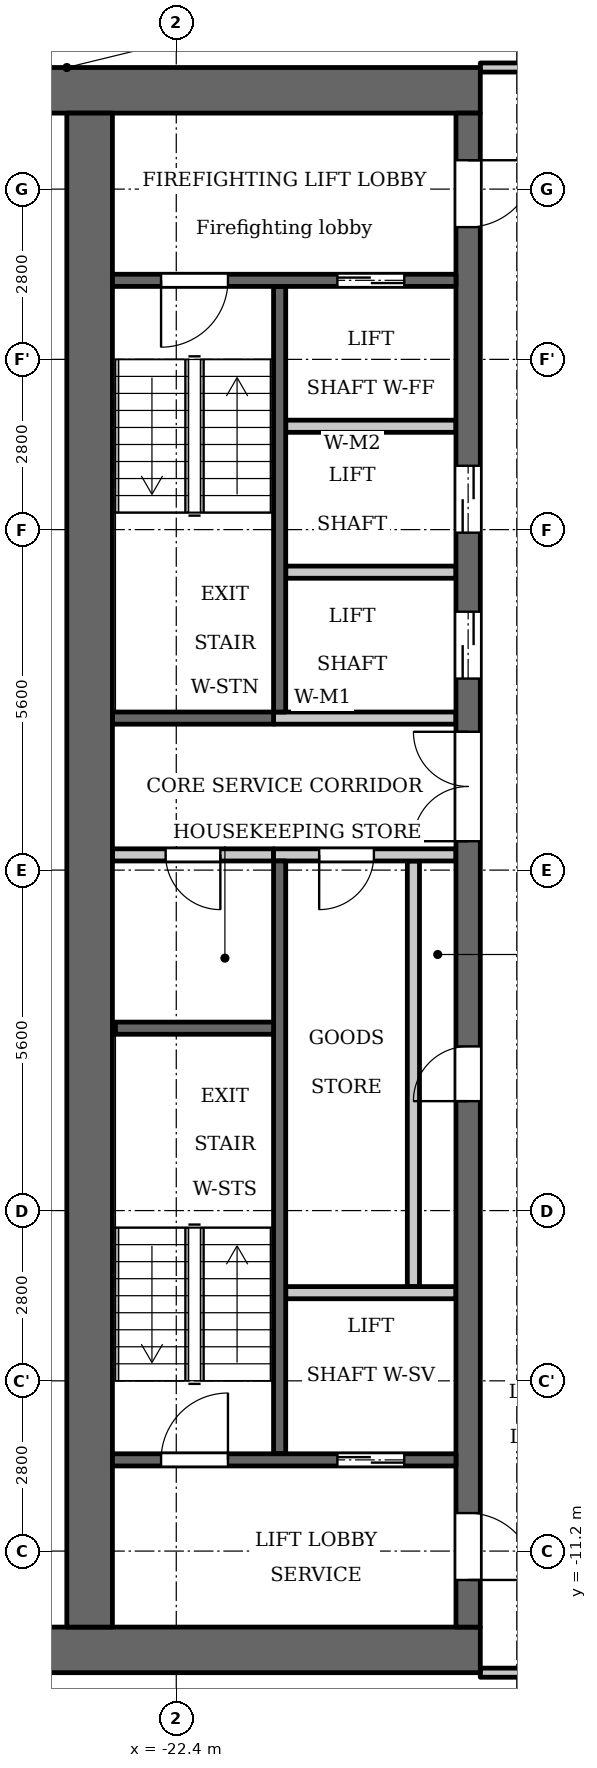
"""IFC4 building model, lengths in metres.
Left out: names, types, materials, properties, quantities, classifications, styles, units other than length and angle.
Written with IfcOpenShell. Run it as: python <this file> out.ifc"""

import sys

from ifc_helpers import new_model, si_unit, direction, frame, frame_2d, origin, place, context, subcontext, project, spatial, rectangle, extrude, element, fill, save


model = new_model("IFC4")
c1 = context("Model", 3, precision=1e-05, world=origin(), true_north=direction((0.0, 1.0)))
c2 = subcontext(c1, "Body", "Model", "MODEL_VIEW")
j1 = project(units=[si_unit("LENGTHUNIT", "METRE"), si_unit("PLANEANGLEUNIT", "RADIAN")], contexts=[c1])
p1 = place(None, origin())
s1 = spatial("IfcSite", under=j1, at=p1, CompositionType="ELEMENT")
p2 = place(p1, origin())
s2 = spatial("IfcBuilding", under=s1, at=p2, CompositionType="ELEMENT")
p3 = place(p2, frame((0.0, 0.0, 223.9)))
s3 = spatial("IfcBuildingStorey", under=s2, at=p3, CompositionType="ELEMENT", Elevation=223.9)
p4 = place(p3, frame((-20.7, 2.6, 0.0), z_axis=(0.0, 0.0, 1.0), x_axis=(0.0, 1.0, 0.0)))
e1 = element("IfcWall", 1, at=p4, inside=s3, PredefinedType="SHEAR", context=c2, shape_type="SweptSolid", body=[
    extrude(rectangle(XDim=7.0, YDim=0.2, at=frame_2d((3.5, 0.0))), origin(), (0.0, 0.0, 1.0), 3.2),
])
p5 = place(p3, frame((-20.7, -9.6, 0.0), z_axis=(0.0, 0.0, 1.0), x_axis=(0.0, 1.0, 0.0)))
e2 = element("IfcWall", 2, at=p5, inside=s3, PredefinedType="SHEAR", context=c2, shape_type="SweptSolid", body=[
    extrude(rectangle(XDim=9.75, YDim=0.2, at=frame_2d((4.875, 0.0))), origin(), (0.0, 0.0, 1.0), 3.2),
])
p6 = place(p3, frame((-20.8, 2.5, 0.0), z_axis=(0.0, 0.0, 1.0), x_axis=(-1.0, 0.0, 0.0)))
e3 = element("IfcWall", 3, at=p6, inside=s3, PredefinedType="SHEAR", context=c2, shape_type="SweptSolid", body=[
    extrude(rectangle(XDim=2.65, YDim=0.2, at=frame_2d((1.325, 0.0))), origin(), (0.0, 0.0, 1.0), 3.2),
])
p7 = place(p3, frame((-20.8, 0.25, 0.0), z_axis=(0.0, 0.0, 1.0), x_axis=(-1.0, 0.0, 0.0)))
e4 = element("IfcWall", 4, at=p7, inside=s3, PredefinedType="PARTITIONING", context=c2, shape_type="SweptSolid", body=[
    extrude(rectangle(XDim=2.65, YDim=0.2, at=frame_2d((1.325, 0.0))), origin(), (0.0, 0.0, 1.0), 3.2),
])
p8 = place(p7, frame((0.875, 0.0, 0.0)))
e5 = element("IfcOpeningElement", 5, at=p8, cuts=e4, PredefinedType="OPENING", context=c2, shape_type="SweptSolid", body=[
    extrude(rectangle(XDim=0.9, YDim=2.1, at=frame_2d((0.45, 1.05))), frame((0.0, 0.11, 0.0), z_axis=(0.0, -1.0, 0.0), x_axis=(1.0, 0.0, 0.0)), (0.0, 0.0, 1.0), 0.22),
])
for number, where, z_axis, x_axis in (
    (6, (-17.4, 12.825, 0.0), (0.0, 0.0, 1.0), (-1.0, 0.0, 0.0)),
    (7, (-17.4, -12.825, 0.0), (0.0, 0.0, 1.0), (-1.0, 0.0, 0.0)),
):
    element("IfcWall", number, at=place(p3, frame(where, z_axis=z_axis, x_axis=x_axis)), inside=s3, PredefinedType="SHEAR", context=c2, shape_type="SweptSolid", body=[
        extrude(rectangle(XDim=7.6, YDim=0.75, at=frame_2d((3.8, 0.0))), origin(), (0.0, 0.0, 1.0), 3.2),
    ])
p9 = place(p3, frame((-18.5, -6.85, 0.0), z_axis=(0.0, 0.0, 1.0), x_axis=(0.0, 1.0, 0.0)))
e8 = element("IfcWall", 8, at=p9, inside=s3, PredefinedType="PARTITIONING", context=c2, shape_type="SweptSolid", body=[
    extrude(rectangle(XDim=7.0, YDim=0.2, at=frame_2d((3.5, 0.0))), origin(), (0.0, 0.0, 1.0), 3.2),
])
p10 = place(p3, frame((-17.6, -12.45, 0.0), z_axis=(0.0, 0.0, 1.0), x_axis=(0.0, 1.0, 0.0)))
e9 = element("IfcWall", 9, at=p10, inside=s3, PredefinedType="SHEAR", context=c2, shape_type="SweptSolid", body=[
    extrude(rectangle(XDim=24.9, YDim=0.4, at=frame_2d((12.45, 0.0))), origin(), (0.0, 0.0, 1.0), 3.2),
])
p11 = place(p10, frame((8.65, 0.0, 0.0)))
e10 = element("IfcOpeningElement", 10, at=p11, cuts=e9, PredefinedType="OPENING", context=c2, shape_type="SweptSolid", body=[
    extrude(rectangle(XDim=0.9, YDim=2.1, at=frame_2d((0.45, 1.05))), frame((0.0, 0.21, 0.0), z_axis=(0.0, -1.0, 0.0), x_axis=(1.0, 0.0, 0.0)), (0.0, 0.0, 1.0), 0.42),
])
p12 = place(p10, frame((15.6, 0.0, 0.0)))
e11 = element("IfcOpeningElement", 11, at=p12, cuts=e9, PredefinedType="OPENING", context=c2, shape_type="SweptSolid", body=[
    extrude(rectangle(XDim=1.1, YDim=2.1, at=frame_2d((0.55, 1.05))), frame((0.0, 0.21, 0.0), z_axis=(0.0, -1.0, 0.0), x_axis=(1.0, 0.0, 0.0)), (0.0, 0.0, 1.0), 0.42),
])
p13 = place(p10, frame((18.0, 0.0, 0.0)))
e12 = element("IfcOpeningElement", 12, at=p13, cuts=e9, PredefinedType="OPENING", context=c2, shape_type="SweptSolid", body=[
    extrude(rectangle(XDim=1.1, YDim=2.1, at=frame_2d((0.55, 1.05))), frame((0.0, 0.21, 0.0), z_axis=(0.0, -1.0, 0.0), x_axis=(1.0, 0.0, 0.0)), (0.0, 0.0, 1.0), 0.42),
])
p14 = place(p10, frame((23.025, 0.0, 0.0)))
e13 = element("IfcOpeningElement", 13, at=p14, cuts=e9, PredefinedType="OPENING", context=c2, shape_type="SweptSolid", body=[
    extrude(rectangle(XDim=1.1, YDim=2.1, at=frame_2d((0.55, 1.05))), frame((0.0, 0.21, 0.0), z_axis=(0.0, -1.0, 0.0), x_axis=(1.0, 0.0, 0.0)), (0.0, 0.0, 1.0), 0.42),
])
p15 = place(p10, frame((0.775, 0.0, 0.0)))
e14 = element("IfcOpeningElement", 14, at=p15, cuts=e9, PredefinedType="OPENING", context=c2, shape_type="SweptSolid", body=[
    extrude(rectangle(XDim=1.1, YDim=2.1, at=frame_2d((0.55, 1.05))), frame((0.0, 0.21, 0.0), z_axis=(0.0, -1.0, 0.0), x_axis=(1.0, 0.0, 0.0)), (0.0, 0.0, 1.0), 0.42),
])
p16 = place(p10, frame((12.925, 0.0, 0.0)))
e15 = element("IfcOpeningElement", 15, at=p16, cuts=e9, PredefinedType="OPENING", context=c2, shape_type="SweptSolid", body=[
    extrude(rectangle(XDim=1.8, YDim=2.1, at=frame_2d((0.9, 1.05))), frame((0.0, 0.21, 0.0), z_axis=(0.0, -1.0, 0.0), x_axis=(1.0, 0.0, 0.0)), (0.0, 0.0, 1.0), 0.42),
])
p17 = place(p3, frame((-23.825, -12.45, 0.0), z_axis=(0.0, 0.0, 1.0), x_axis=(0.0, 1.0, 0.0)))
e16 = element("IfcWall", 16, at=p17, inside=s3, PredefinedType="SHEAR", context=c2, shape_type="SweptSolid", body=[
    extrude(rectangle(XDim=24.9, YDim=0.75, at=frame_2d((12.45, 0.0))), origin(), (0.0, 0.0, 1.0), 3.2),
])
p18 = place(p3, frame((-17.8, -9.7, 0.0), z_axis=(0.0, 0.0, 1.0), x_axis=(-1.0, 0.0, 0.0)))
e17 = element("IfcWall", 17, at=p18, inside=s3, PredefinedType="SHEAR", context=c2, shape_type="SweptSolid", body=[
    extrude(rectangle(XDim=5.65, YDim=0.2, at=frame_2d((2.825, 0.0))), origin(), (0.0, 0.0, 1.0), 3.2),
])
p19 = place(p18, frame((0.85, 0.0, 0.0)))
e18 = element("IfcOpeningElement", 18, at=p19, cuts=e17, PredefinedType="OPENING", context=c2, shape_type="SweptSolid", body=[
    extrude(rectangle(XDim=1.1, YDim=2.1, at=frame_2d((0.55, 1.05))), frame((0.0, 0.11, 0.0), z_axis=(0.0, -1.0, 0.0), x_axis=(1.0, 0.0, 0.0)), (0.0, 0.0, 1.0), 0.22),
])
p20 = place(p18, frame((3.75, 0.0, 0.0)))
e19 = element("IfcOpeningElement", 19, at=p20, cuts=e17, PredefinedType="OPENING", context=c2, shape_type="SweptSolid", body=[
    extrude(rectangle(XDim=1.1, YDim=2.1, at=frame_2d((0.55, 1.05))), frame((0.0, 0.11, 0.0), z_axis=(0.0, -1.0, 0.0), x_axis=(1.0, 0.0, 0.0)), (0.0, 0.0, 1.0), 0.22),
])
p21 = place(p3, frame((-17.8, -6.95, 0.0), z_axis=(0.0, 0.0, 1.0), x_axis=(-1.0, 0.0, 0.0)))
e20 = element("IfcWall", 20, at=p21, inside=s3, PredefinedType="PARTITIONING", context=c2, shape_type="SweptSolid", body=[
    extrude(rectangle(XDim=2.8, YDim=0.2, at=frame_2d((1.4, 0.0))), origin(), (0.0, 0.0, 1.0), 3.2),
])
p22 = place(p3, frame((-17.8, 0.25, 0.0), z_axis=(0.0, 0.0, 1.0), x_axis=(-1.0, 0.0, 0.0)))
e21 = element("IfcWall", 21, at=p22, inside=s3, PredefinedType="PARTITIONING", context=c2, shape_type="SweptSolid", body=[
    extrude(rectangle(XDim=3.0, YDim=0.2, at=frame_2d((1.5, 0.0))), origin(), (0.0, 0.0, 1.0), 3.2),
])
p23 = place(p22, frame((1.35, 0.0, 0.0)))
e22 = element("IfcOpeningElement", 22, at=p23, cuts=e21, PredefinedType="OPENING", context=c2, shape_type="SweptSolid", body=[
    extrude(rectangle(XDim=0.9, YDim=2.1, at=frame_2d((0.45, 1.05))), frame((0.0, 0.11, 0.0), z_axis=(0.0, -1.0, 0.0), x_axis=(1.0, 0.0, 0.0)), (0.0, 0.0, 1.0), 0.22),
])
p24 = place(p3, frame((-17.8, 2.5, 0.0), z_axis=(0.0, 0.0, 1.0), x_axis=(-1.0, 0.0, 0.0)))
e23 = element("IfcWall", 23, at=p24, inside=s3, PredefinedType="PARTITIONING", context=c2, shape_type="SweptSolid", body=[
    extrude(rectangle(XDim=3.0, YDim=0.2, at=frame_2d((1.5, 0.0))), origin(), (0.0, 0.0, 1.0), 3.2),
])
for number, where, z_axis, x_axis in (
    (24, (-17.8, 4.9, 0.0), (0.0, 0.0, 1.0), (-1.0, 0.0, 0.0)),
    (25, (-17.8, 7.3, 0.0), (0.0, 0.0, 1.0), (-1.0, 0.0, 0.0)),
):
    element("IfcWall", number, at=place(p3, frame(where, z_axis=z_axis, x_axis=x_axis)), inside=s3, PredefinedType="PARTITIONING", context=c2, shape_type="SweptSolid", body=[
        extrude(rectangle(XDim=2.8, YDim=0.2, at=frame_2d((1.4, 0.0))), origin(), (0.0, 0.0, 1.0), 3.2),
    ])
p25 = place(p3, frame((-17.8, 9.7, 0.0), z_axis=(0.0, 0.0, 1.0), x_axis=(-1.0, 0.0, 0.0)))
e26 = element("IfcWall", 26, at=p25, inside=s3, PredefinedType="SHEAR", context=c2, shape_type="SweptSolid", body=[
    extrude(rectangle(XDim=5.65, YDim=0.2, at=frame_2d((2.825, 0.0))), origin(), (0.0, 0.0, 1.0), 3.2),
])
p26 = place(p25, frame((0.85, 0.0, 0.0)))
e27 = element("IfcOpeningElement", 27, at=p26, cuts=e26, PredefinedType="OPENING", context=c2, shape_type="SweptSolid", body=[
    extrude(rectangle(XDim=1.1, YDim=2.1, at=frame_2d((0.55, 1.05))), frame((0.0, 0.11, 0.0), z_axis=(0.0, -1.0, 0.0), x_axis=(1.0, 0.0, 0.0)), (0.0, 0.0, 1.0), 0.22),
])
p27 = place(p25, frame((3.75, 0.0, 0.0)))
e28 = element("IfcOpeningElement", 28, at=p27, cuts=e26, PredefinedType="OPENING", context=c2, shape_type="SweptSolid", body=[
    extrude(rectangle(XDim=1.1, YDim=2.1, at=frame_2d((0.55, 1.05))), frame((0.0, 0.11, 0.0), z_axis=(0.0, -1.0, 0.0), x_axis=(1.0, 0.0, 0.0)), (0.0, 0.0, 1.0), 0.22),
])
p28 = place(p3, frame((-20.8, -2.6, 0.0), z_axis=(0.0, 0.0, 1.0), x_axis=(-1.0, 0.0, 0.0)))
e29 = element("IfcWall", 29, at=p28, inside=s3, PredefinedType="SHEAR", context=c2, shape_type="SweptSolid", body=[
    extrude(rectangle(XDim=2.6, YDim=0.2, at=frame_2d((1.3, 0.0))), origin(), (0.0, 0.0, 1.0), 3.2),
])
p29 = place(p3, frame((-17.4, -13.2, 0.0), z_axis=(0.0, 0.0, 1.0), x_axis=(1.0, 0.0, 0.0)))
e30 = element("IfcWall", 30, at=p29, inside=s3, PredefinedType="PARTITIONING", context=c2, shape_type="SweptSolid", body=[
    extrude(rectangle(XDim=34.8, YDim=0.15, at=frame_2d((17.4, 0.0))), origin(), (0.0, 0.0, 1.0), 3.2),
])
p30 = place(p29, frame((0.65, 0.0, 0.0)))
e31 = element("IfcOpeningElement", 31, at=p30, cuts=e30, PredefinedType="OPENING", context=c2, shape_type="SweptSolid", body=[
    extrude(rectangle(XDim=1.0, YDim=2.1, at=frame_2d((0.5, 1.05))), frame((0.0, 0.085, 0.0), z_axis=(0.0, -1.0, 0.0), x_axis=(1.0, 0.0, 0.0)), (0.0, 0.0, 1.0), 0.17),
])
p31 = place(p29, frame((33.05, 0.0, 0.0)))
e32 = element("IfcOpeningElement", 32, at=p31, cuts=e30, PredefinedType="OPENING", context=c2, shape_type="SweptSolid", body=[
    extrude(rectangle(XDim=1.0, YDim=2.1, at=frame_2d((0.5, 1.05))), frame((0.0, 0.085, 0.0), z_axis=(0.0, -1.0, 0.0), x_axis=(1.0, 0.0, 0.0)), (0.0, 0.0, 1.0), 0.17),
])
p32 = place(p29, frame((10.15, 0.0, 0.0)))
e33 = element("IfcOpeningElement", 33, at=p32, cuts=e30, PredefinedType="OPENING", context=c2, shape_type="SweptSolid", body=[
    extrude(rectangle(XDim=1.0, YDim=2.1, at=frame_2d((0.5, 1.05))), frame((0.0, 0.085, 0.0), z_axis=(0.0, -1.0, 0.0), x_axis=(1.0, 0.0, 0.0)), (0.0, 0.0, 1.0), 0.17),
])
p33 = place(p29, frame((12.5, 0.0, 0.0)))
e34 = element("IfcOpeningElement", 34, at=p33, cuts=e30, PredefinedType="OPENING", context=c2, shape_type="SweptSolid", body=[
    extrude(rectangle(XDim=1.0, YDim=2.1, at=frame_2d((0.5, 1.05))), frame((0.0, 0.085, 0.0), z_axis=(0.0, -1.0, 0.0), x_axis=(1.0, 0.0, 0.0)), (0.0, 0.0, 1.0), 0.17),
])
p34 = place(p29, frame((18.0, 0.0, 0.0)))
e35 = element("IfcOpeningElement", 35, at=p34, cuts=e30, PredefinedType="OPENING", context=c2, shape_type="SweptSolid", body=[
    extrude(rectangle(XDim=1.0, YDim=2.1, at=frame_2d((0.5, 1.05))), frame((0.0, 0.085, 0.0), z_axis=(0.0, -1.0, 0.0), x_axis=(1.0, 0.0, 0.0)), (0.0, 0.0, 1.0), 0.17),
])
p35 = place(p29, frame((30.75, 0.0, 0.0)))
e36 = element("IfcOpeningElement", 36, at=p35, cuts=e30, PredefinedType="OPENING", context=c2, shape_type="SweptSolid", body=[
    extrude(rectangle(XDim=1.0, YDim=2.1, at=frame_2d((0.5, 1.05))), frame((0.0, 0.085, 0.0), z_axis=(0.0, -1.0, 0.0), x_axis=(1.0, 0.0, 0.0)), (0.0, 0.0, 1.0), 0.17),
])
p36 = place(p3, frame((-17.4, 13.2, 0.0), z_axis=(0.0, 0.0, 1.0), x_axis=(1.0, 0.0, 0.0)))
e37 = element("IfcWall", 37, at=p36, inside=s3, PredefinedType="PARTITIONING", context=c2, shape_type="SweptSolid", body=[
    extrude(rectangle(XDim=34.8, YDim=0.15, at=frame_2d((17.4, 0.0))), origin(), (0.0, 0.0, 1.0), 3.2),
])
p37 = place(p36, frame((0.75, 0.0, 0.0)))
e38 = element("IfcOpeningElement", 38, at=p37, cuts=e37, PredefinedType="OPENING", context=c2, shape_type="SweptSolid", body=[
    extrude(rectangle(XDim=1.0, YDim=2.1, at=frame_2d((0.5, 1.05))), frame((0.0, 0.085, 0.0), z_axis=(0.0, -1.0, 0.0), x_axis=(1.0, 0.0, 0.0)), (0.0, 0.0, 1.0), 0.17),
])
p38 = place(p36, frame((33.15, 0.0, 0.0)))
e39 = element("IfcOpeningElement", 39, at=p38, cuts=e37, PredefinedType="OPENING", context=c2, shape_type="SweptSolid", body=[
    extrude(rectangle(XDim=1.0, YDim=2.1, at=frame_2d((0.5, 1.05))), frame((0.0, 0.085, 0.0), z_axis=(0.0, -1.0, 0.0), x_axis=(1.0, 0.0, 0.0)), (0.0, 0.0, 1.0), 0.17),
])
p39 = place(p36, frame((3.05, 0.0, 0.0)))
e40 = element("IfcOpeningElement", 40, at=p39, cuts=e37, PredefinedType="OPENING", context=c2, shape_type="SweptSolid", body=[
    extrude(rectangle(XDim=1.0, YDim=2.1, at=frame_2d((0.5, 1.05))), frame((0.0, 0.085, 0.0), z_axis=(0.0, -1.0, 0.0), x_axis=(1.0, 0.0, 0.0)), (0.0, 0.0, 1.0), 0.17),
])
p40 = place(p36, frame((10.1, 0.0, 0.0)))
e41 = element("IfcOpeningElement", 41, at=p40, cuts=e37, PredefinedType="OPENING", context=c2, shape_type="SweptSolid", body=[
    extrude(rectangle(XDim=1.0, YDim=2.1, at=frame_2d((0.5, 1.05))), frame((0.0, 0.085, 0.0), z_axis=(0.0, -1.0, 0.0), x_axis=(1.0, 0.0, 0.0)), (0.0, 0.0, 1.0), 0.17),
])
p41 = place(p36, frame((12.45, 0.0, 0.0)))
e42 = element("IfcOpeningElement", 42, at=p41, cuts=e37, PredefinedType="OPENING", context=c2, shape_type="SweptSolid", body=[
    extrude(rectangle(XDim=1.0, YDim=2.1, at=frame_2d((0.5, 1.05))), frame((0.0, 0.085, 0.0), z_axis=(0.0, -1.0, 0.0), x_axis=(1.0, 0.0, 0.0)), (0.0, 0.0, 1.0), 0.17),
])
p42 = place(p36, frame((21.3, 0.0, 0.0)))
e43 = element("IfcOpeningElement", 43, at=p42, cuts=e37, PredefinedType="OPENING", context=c2, shape_type="SweptSolid", body=[
    extrude(rectangle(XDim=1.0, YDim=2.1, at=frame_2d((0.5, 1.05))), frame((0.0, 0.085, 0.0), z_axis=(0.0, -1.0, 0.0), x_axis=(1.0, 0.0, 0.0)), (0.0, 0.0, 1.0), 0.17),
])
p43 = place(p36, frame((23.65, 0.0, 0.0)))
e44 = element("IfcOpeningElement", 44, at=p43, cuts=e37, PredefinedType="OPENING", context=c2, shape_type="SweptSolid", body=[
    extrude(rectangle(XDim=1.0, YDim=2.1, at=frame_2d((0.5, 1.05))), frame((0.0, 0.085, 0.0), z_axis=(0.0, -1.0, 0.0), x_axis=(1.0, 0.0, 0.0)), (0.0, 0.0, 1.0), 0.17),
])
p44 = place(p36, frame((30.75, 0.0, 0.0)))
e45 = element("IfcOpeningElement", 45, at=p44, cuts=e37, PredefinedType="OPENING", context=c2, shape_type="SweptSolid", body=[
    extrude(rectangle(XDim=1.0, YDim=2.1, at=frame_2d((0.5, 1.05))), frame((0.0, 0.085, 0.0), z_axis=(0.0, -1.0, 0.0), x_axis=(1.0, 0.0, 0.0)), (0.0, 0.0, 1.0), 0.17),
])
p45 = place(p19, origin())
e46 = element("IfcDoor", 46, at=p45, inside=s3, OperationType="DOUBLE_DOOR_SLIDING", PredefinedType="DOOR", context=c2, shape_type="SweptSolid", body=[
    extrude(rectangle(XDim=1.1, YDim=2.1, at=frame_2d((0.55, 1.05))), frame((0.0, 0.025, 0.0), z_axis=(0.0, -1.0, 0.0), x_axis=(1.0, 0.0, 0.0)), (0.0, 0.0, 1.0), 0.05),
])
fill(e18, e46)
p46 = place(p11, origin())
e47 = element("IfcDoor", 47, at=p46, inside=s3, OperationType="SINGLE_SWING_RIGHT", PredefinedType="DOOR", context=c2, shape_type="SweptSolid", body=[
    extrude(rectangle(XDim=0.9, YDim=2.1, at=frame_2d((0.45, 1.05))), frame((0.0, 0.025, 0.0), z_axis=(0.0, -1.0, 0.0), x_axis=(1.0, 0.0, 0.0)), (0.0, 0.0, 1.0), 0.05),
])
fill(e10, e47)
p47 = place(p23, origin())
e48 = element("IfcDoor", 48, at=p47, inside=s3, OperationType="SINGLE_SWING_LEFT", PredefinedType="DOOR", context=c2, shape_type="SweptSolid", body=[
    extrude(rectangle(XDim=0.9, YDim=2.1, at=frame_2d((0.45, 1.05))), frame((0.0, 0.025, 0.0), z_axis=(0.0, -1.0, 0.0), x_axis=(1.0, 0.0, 0.0)), (0.0, 0.0, 1.0), 0.05),
])
fill(e22, e48)
p48 = place(p12, origin())
e49 = element("IfcDoor", 49, at=p48, inside=s3, OperationType="DOUBLE_DOOR_SLIDING", PredefinedType="DOOR", context=c2, shape_type="SweptSolid", body=[
    extrude(rectangle(XDim=1.1, YDim=2.1, at=frame_2d((0.55, 1.05))), frame((0.0, 0.025, 0.0), z_axis=(0.0, -1.0, 0.0), x_axis=(1.0, 0.0, 0.0)), (0.0, 0.0, 1.0), 0.05),
])
fill(e11, e49)
p49 = place(p13, origin())
e50 = element("IfcDoor", 50, at=p49, inside=s3, OperationType="DOUBLE_DOOR_SLIDING", PredefinedType="DOOR", context=c2, shape_type="SweptSolid", body=[
    extrude(rectangle(XDim=1.1, YDim=2.1, at=frame_2d((0.55, 1.05))), frame((0.0, 0.025, 0.0), z_axis=(0.0, -1.0, 0.0), x_axis=(1.0, 0.0, 0.0)), (0.0, 0.0, 1.0), 0.05),
])
fill(e12, e50)
p50 = place(p26, origin())
e51 = element("IfcDoor", 51, at=p50, inside=s3, OperationType="DOUBLE_DOOR_SLIDING", PredefinedType="DOOR", context=c2, shape_type="SweptSolid", body=[
    extrude(rectangle(XDim=1.1, YDim=2.1, at=frame_2d((0.55, 1.05))), frame((0.0, 0.025, 0.0), z_axis=(0.0, -1.0, 0.0), x_axis=(1.0, 0.0, 0.0)), (0.0, 0.0, 1.0), 0.05),
])
fill(e27, e51)
p51 = place(p14, origin())
e52 = element("IfcDoor", 52, at=p51, inside=s3, OperationType="SINGLE_SWING_RIGHT", PredefinedType="DOOR", context=c2, shape_type="SweptSolid", body=[
    extrude(rectangle(XDim=1.1, YDim=2.1, at=frame_2d((0.55, 1.05))), frame((0.0, 0.025, 0.0), z_axis=(0.0, -1.0, 0.0), x_axis=(1.0, 0.0, 0.0)), (0.0, 0.0, 1.0), 0.05),
])
fill(e13, e52)
p52 = place(p15, origin())
e53 = element("IfcDoor", 53, at=p52, inside=s3, OperationType="SINGLE_SWING_LEFT", PredefinedType="DOOR", context=c2, shape_type="SweptSolid", body=[
    extrude(rectangle(XDim=1.1, YDim=2.1, at=frame_2d((0.55, 1.05))), frame((0.0, 0.025, 0.0), z_axis=(0.0, -1.0, 0.0), x_axis=(1.0, 0.0, 0.0)), (0.0, 0.0, 1.0), 0.05),
])
fill(e14, e53)
p53 = place(p27, origin())
e54 = element("IfcDoor", 54, at=p53, inside=s3, OperationType="SINGLE_SWING_LEFT", PredefinedType="DOOR", context=c2, shape_type="SweptSolid", body=[
    extrude(rectangle(XDim=1.1, YDim=2.1, at=frame_2d((0.55, 1.05))), frame((0.0, 0.025, 0.0), z_axis=(0.0, -1.0, 0.0), x_axis=(1.0, 0.0, 0.0)), (0.0, 0.0, 1.0), 0.05),
])
fill(e28, e54)
p54 = place(p20, origin())
e55 = element("IfcDoor", 55, at=p54, inside=s3, OperationType="SINGLE_SWING_LEFT", PredefinedType="DOOR", context=c2, shape_type="SweptSolid", body=[
    extrude(rectangle(XDim=1.1, YDim=2.1, at=frame_2d((0.55, 1.05))), frame((0.0, 0.025, 0.0), z_axis=(0.0, -1.0, 0.0), x_axis=(1.0, 0.0, 0.0)), (0.0, 0.0, 1.0), 0.05),
])
fill(e19, e55)
p55 = place(p16, origin())
e56 = element("IfcDoor", 56, at=p55, inside=s3, OperationType="DOUBLE_DOOR_SINGLE_SWING", PredefinedType="DOOR", context=c2, shape_type="SweptSolid", body=[
    extrude(rectangle(XDim=1.8, YDim=2.1, at=frame_2d((0.9, 1.05))), frame((0.0, 0.025, 0.0), z_axis=(0.0, -1.0, 0.0), x_axis=(1.0, 0.0, 0.0)), (0.0, 0.0, 1.0), 0.05),
])
fill(e15, e56)
p56 = place(p8, origin())
e57 = element("IfcDoor", 57, at=p56, inside=s3, OperationType="SINGLE_SWING_RIGHT", PredefinedType="DOOR", context=c2, shape_type="SweptSolid", body=[
    extrude(rectangle(XDim=0.9, YDim=2.1, at=frame_2d((0.45, 1.05))), frame((0.0, 0.025, 0.0), z_axis=(0.0, -1.0, 0.0), x_axis=(1.0, 0.0, 0.0)), (0.0, 0.0, 1.0), 0.05),
])
fill(e5, e57)
save(model, sys.argv[1])
